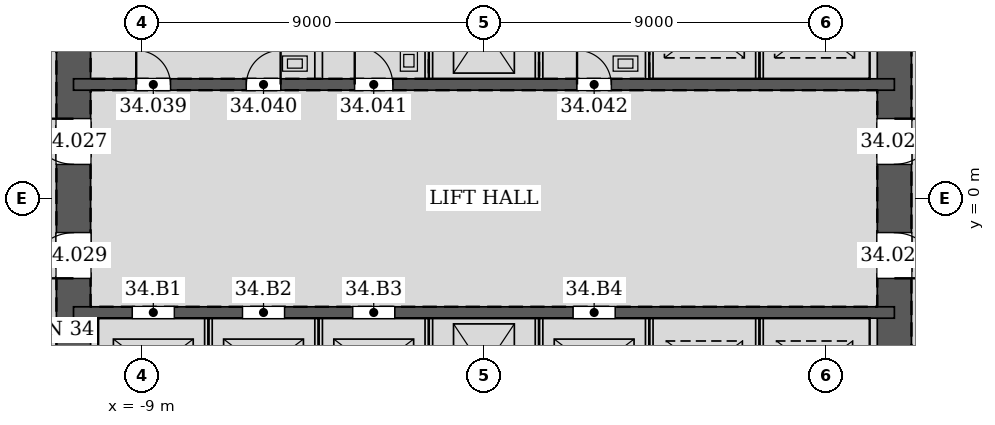
"""IFC4 building model, lengths in metres.
Left out: names, types, materials, properties, quantities, classifications, styles, units other than length and angle.
Written with IfcOpenShell. Run it as: python <this file> out.ifc"""

import sys

from ifc_helpers import new_model, si_unit, direction, frame, frame_2d, origin, place, context, subcontext, project, spatial, rectangle, extrude, element, fill, save


model = new_model("IFC4")
c1 = context("Model", 3, precision=1e-05, world=origin(), true_north=direction((0.0, 1.0)))
c2 = subcontext(c1, "Body", "Model", "MODEL_VIEW")
j1 = project(units=[si_unit("LENGTHUNIT", "METRE"), si_unit("PLANEANGLEUNIT", "RADIAN")], contexts=[c1])
p1 = place(None, origin())
s1 = spatial("IfcSite", under=j1, at=p1, CompositionType="ELEMENT")
p2 = place(p1, origin())
s2 = spatial("IfcBuilding", under=s1, at=p2, CompositionType="ELEMENT")
p3 = place(p2, frame((0.0, 0.0, 151.2)))
s3 = spatial("IfcBuildingStorey", under=s2, at=p3, CompositionType="ELEMENT", Elevation=151.2)
p4 = place(p3, frame((10.8, -10.8, 0.0), z_axis=(0.0, 0.0, 1.0), x_axis=(0.0, 1.0, 0.0)))
e1 = element("IfcWall", 1, at=p4, inside=s3, PredefinedType="SOLIDWALL", context=c2, shape_type="SweptSolid", body=[
    extrude(rectangle(XDim=21.6, YDim=0.9, at=frame_2d((10.8, 0.0))), origin(), (0.0, 0.0, 1.0), 4.2),
])
p5 = place(p4, frame((11.7, 0.0, 0.0)))
e2 = element("IfcOpeningElement", 2, at=p5, cuts=e1, PredefinedType="OPENING", context=c2, shape_type="SweptSolid", body=[
    extrude(rectangle(XDim=1.2, YDim=2.1, at=frame_2d((0.6, 1.05))), frame((0.0, 0.46, 0.0), z_axis=(0.0, -1.0, 0.0), x_axis=(1.0, 0.0, 0.0)), (0.0, 0.0, 1.0), 0.92),
])
p6 = place(p4, frame((8.7, 0.0, 0.0)))
e3 = element("IfcOpeningElement", 3, at=p6, cuts=e1, PredefinedType="OPENING", context=c2, shape_type="SweptSolid", body=[
    extrude(rectangle(XDim=1.2, YDim=2.1, at=frame_2d((0.6, 1.05))), frame((0.0, 0.46, 0.0), z_axis=(0.0, -1.0, 0.0), x_axis=(1.0, 0.0, 0.0)), (0.0, 0.0, 1.0), 0.92),
])
p7 = place(p3, frame((-10.8, 10.8, 0.0), z_axis=(0.0, 0.0, 1.0), x_axis=(0.0, -1.0, 0.0)))
e4 = element("IfcWall", 4, at=p7, inside=s3, PredefinedType="SOLIDWALL", context=c2, shape_type="SweptSolid", body=[
    extrude(rectangle(XDim=21.6, YDim=0.9, at=frame_2d((10.8, 0.0))), origin(), (0.0, 0.0, 1.0), 4.2),
])
p8 = place(p7, frame((8.7, 0.0, 0.0)))
e5 = element("IfcOpeningElement", 5, at=p8, cuts=e4, PredefinedType="OPENING", context=c2, shape_type="SweptSolid", body=[
    extrude(rectangle(XDim=1.2, YDim=2.1, at=frame_2d((0.6, 1.05))), frame((0.0, 0.46, 0.0), z_axis=(0.0, -1.0, 0.0), x_axis=(1.0, 0.0, 0.0)), (0.0, 0.0, 1.0), 0.92),
])
p9 = place(p7, frame((11.7, 0.0, 0.0)))
e6 = element("IfcOpeningElement", 6, at=p9, cuts=e4, PredefinedType="OPENING", context=c2, shape_type="SweptSolid", body=[
    extrude(rectangle(XDim=1.2, YDim=2.1, at=frame_2d((0.6, 1.05))), frame((0.0, 0.46, 0.0), z_axis=(0.0, -1.0, 0.0), x_axis=(1.0, 0.0, 0.0)), (0.0, 0.0, 1.0), 0.92),
])
p10 = place(p3, frame((-10.8, 3.0, 0.0), z_axis=(0.0, 0.0, 1.0), x_axis=(1.0, 0.0, 0.0)))
e7 = element("IfcWall", 7, at=p10, inside=s3, PredefinedType="SOLIDWALL", context=c2, shape_type="SweptSolid", body=[
    extrude(rectangle(XDim=21.6, YDim=0.3, at=frame_2d((10.8, 0.0))), origin(), (0.0, 0.0, 1.0), 4.2),
])
p11 = place(p10, frame((1.65, 0.0, 0.0)))
e8 = element("IfcOpeningElement", 8, at=p11, cuts=e7, PredefinedType="OPENING", context=c2, shape_type="SweptSolid", body=[
    extrude(rectangle(XDim=0.9, YDim=2.1, at=frame_2d((0.45, 1.05))), frame((0.0, 0.16, 0.0), z_axis=(0.0, -1.0, 0.0), x_axis=(1.0, 0.0, 0.0)), (0.0, 0.0, 1.0), 0.32),
])
p12 = place(p10, frame((4.55, 0.0, 0.0)))
e9 = element("IfcOpeningElement", 9, at=p12, cuts=e7, PredefinedType="OPENING", context=c2, shape_type="SweptSolid", body=[
    extrude(rectangle(XDim=0.9, YDim=2.1, at=frame_2d((0.45, 1.05))), frame((0.0, 0.16, 0.0), z_axis=(0.0, -1.0, 0.0), x_axis=(1.0, 0.0, 0.0)), (0.0, 0.0, 1.0), 0.32),
])
p13 = place(p10, frame((7.4, 0.0, 0.0)))
e10 = element("IfcOpeningElement", 10, at=p13, cuts=e7, PredefinedType="OPENING", context=c2, shape_type="SweptSolid", body=[
    extrude(rectangle(XDim=1.0, YDim=2.1, at=frame_2d((0.5, 1.05))), frame((0.0, 0.16, 0.0), z_axis=(0.0, -1.0, 0.0), x_axis=(1.0, 0.0, 0.0)), (0.0, 0.0, 1.0), 0.32),
])
p14 = place(p10, frame((13.25, 0.0, 0.0)))
e11 = element("IfcOpeningElement", 11, at=p14, cuts=e7, PredefinedType="OPENING", context=c2, shape_type="SweptSolid", body=[
    extrude(rectangle(XDim=0.9, YDim=2.1, at=frame_2d((0.45, 1.05))), frame((0.0, 0.16, 0.0), z_axis=(0.0, -1.0, 0.0), x_axis=(1.0, 0.0, 0.0)), (0.0, 0.0, 1.0), 0.32),
])
p15 = place(p3, frame((-10.8, -3.0, 0.0), z_axis=(0.0, 0.0, 1.0), x_axis=(1.0, 0.0, 0.0)))
e12 = element("IfcWall", 12, at=p15, inside=s3, PredefinedType="SOLIDWALL", context=c2, shape_type="SweptSolid", body=[
    extrude(rectangle(XDim=21.6, YDim=0.3, at=frame_2d((10.8, 0.0))), origin(), (0.0, 0.0, 1.0), 4.2),
])
p16 = place(p15, frame((1.55, 0.0, 0.0)))
e13 = element("IfcOpeningElement", 13, at=p16, cuts=e12, PredefinedType="OPENING", context=c2, shape_type="SweptSolid", body=[
    extrude(rectangle(XDim=1.1, YDim=2.1, at=frame_2d((0.55, 1.05))), frame((0.0, 0.16, 0.0), z_axis=(0.0, -1.0, 0.0), x_axis=(1.0, 0.0, 0.0)), (0.0, 0.0, 1.0), 0.32),
])
p17 = place(p15, frame((4.45, 0.0, 0.0)))
e14 = element("IfcOpeningElement", 14, at=p17, cuts=e12, PredefinedType="OPENING", context=c2, shape_type="SweptSolid", body=[
    extrude(rectangle(XDim=1.1, YDim=2.1, at=frame_2d((0.55, 1.05))), frame((0.0, 0.16, 0.0), z_axis=(0.0, -1.0, 0.0), x_axis=(1.0, 0.0, 0.0)), (0.0, 0.0, 1.0), 0.32),
])
p18 = place(p15, frame((7.35, 0.0, 0.0)))
e15 = element("IfcOpeningElement", 15, at=p18, cuts=e12, PredefinedType="OPENING", context=c2, shape_type="SweptSolid", body=[
    extrude(rectangle(XDim=1.1, YDim=2.1, at=frame_2d((0.55, 1.05))), frame((0.0, 0.16, 0.0), z_axis=(0.0, -1.0, 0.0), x_axis=(1.0, 0.0, 0.0)), (0.0, 0.0, 1.0), 0.32),
])
p19 = place(p15, frame((13.15, 0.0, 0.0)))
e16 = element("IfcOpeningElement", 16, at=p19, cuts=e12, PredefinedType="OPENING", context=c2, shape_type="SweptSolid", body=[
    extrude(rectangle(XDim=1.1, YDim=2.1, at=frame_2d((0.55, 1.05))), frame((0.0, 0.16, 0.0), z_axis=(0.0, -1.0, 0.0), x_axis=(1.0, 0.0, 0.0)), (0.0, 0.0, 1.0), 0.32),
])
for number, where, z_axis, x_axis in (
    (17, (-4.35, 3.15, 0.0), (0.0, 0.0, 1.0), (0.0, 1.0, 0.0)),
    (18, (-1.45, 3.15, 0.0), (0.0, 0.0, 1.0), (0.0, 1.0, 0.0)),
    (19, (1.45, 3.15, 0.0), (0.0, 0.0, 1.0), (0.0, 1.0, 0.0)),
    (20, (4.35, 3.15, 0.0), (0.0, 0.0, 1.0), (0.0, 1.0, 0.0)),
):
    element("IfcWall", number, at=place(p3, frame(where, z_axis=z_axis, x_axis=x_axis)), inside=s3, PredefinedType="PARTITIONING", context=c2, shape_type="SweptSolid", body=[
        extrude(rectangle(XDim=2.7, YDim=0.2, at=frame_2d((1.35, 0.0))), origin(), (0.0, 0.0, 1.0), 4.035),
    ])
for number, where, z_axis, x_axis in (
    (21, (7.25, 3.15, 0.0), (0.0, 0.0, 1.0), (0.0, 1.0, 0.0)),
    (22, (-7.25, -5.85, 0.0), (0.0, 0.0, 1.0), (0.0, 1.0, 0.0)),
    (23, (-4.35, -5.85, 0.0), (0.0, 0.0, 1.0), (0.0, 1.0, 0.0)),
    (24, (-1.45, -5.85, 0.0), (0.0, 0.0, 1.0), (0.0, 1.0, 0.0)),
    (25, (1.45, -5.85, 0.0), (0.0, 0.0, 1.0), (0.0, 1.0, 0.0)),
    (26, (4.35, -5.85, 0.0), (0.0, 0.0, 1.0), (0.0, 1.0, 0.0)),
    (27, (7.25, -5.85, 0.0), (0.0, 0.0, 1.0), (0.0, 1.0, 0.0)),
):
    element("IfcWall", number, at=place(p3, frame(where, z_axis=z_axis, x_axis=x_axis)), inside=s3, PredefinedType="PARTITIONING", context=c2, shape_type="SweptSolid", body=[
        extrude(rectangle(XDim=2.7, YDim=0.2, at=frame_2d((1.35, 0.0))), origin(), (0.0, 0.0, 1.0), 4.2),
    ])
p20 = place(p5, frame((1.2, 0.0, 0.0), z_axis=(0.0, 0.0, 1.0), x_axis=(-1.0, 0.0, 0.0)))
e28 = element("IfcDoor", 28, at=p20, inside=s3, OperationType="SINGLE_SWING_LEFT", PredefinedType="DOOR", context=c2, shape_type="SweptSolid", body=[
    extrude(rectangle(XDim=1.2, YDim=2.1, at=frame_2d((0.6, 1.05))), frame((0.0, 0.025, 0.0), z_axis=(0.0, -1.0, 0.0), x_axis=(1.0, 0.0, 0.0)), (0.0, 0.0, 1.0), 0.05),
])
fill(e2, e28)
p21 = place(p8, frame((1.2, 0.0, 0.0), z_axis=(0.0, 0.0, 1.0), x_axis=(-1.0, 0.0, 0.0)))
e29 = element("IfcDoor", 29, at=p21, inside=s3, OperationType="SINGLE_SWING_RIGHT", PredefinedType="DOOR", context=c2, shape_type="SweptSolid", body=[
    extrude(rectangle(XDim=1.2, YDim=2.1, at=frame_2d((0.6, 1.05))), frame((0.0, 0.025, 0.0), z_axis=(0.0, -1.0, 0.0), x_axis=(1.0, 0.0, 0.0)), (0.0, 0.0, 1.0), 0.05),
])
fill(e5, e29)
p22 = place(p6, frame((1.2, 0.0, 0.0), z_axis=(0.0, 0.0, 1.0), x_axis=(-1.0, 0.0, 0.0)))
e30 = element("IfcDoor", 30, at=p22, inside=s3, OperationType="SINGLE_SWING_RIGHT", PredefinedType="DOOR", context=c2, shape_type="SweptSolid", body=[
    extrude(rectangle(XDim=1.2, YDim=2.1, at=frame_2d((0.6, 1.05))), frame((0.0, 0.025, 0.0), z_axis=(0.0, -1.0, 0.0), x_axis=(1.0, 0.0, 0.0)), (0.0, 0.0, 1.0), 0.05),
])
fill(e3, e30)
p23 = place(p9, frame((1.2, 0.0, 0.0), z_axis=(0.0, 0.0, 1.0), x_axis=(-1.0, 0.0, 0.0)))
e31 = element("IfcDoor", 31, at=p23, inside=s3, OperationType="SINGLE_SWING_LEFT", PredefinedType="DOOR", context=c2, shape_type="SweptSolid", body=[
    extrude(rectangle(XDim=1.2, YDim=2.1, at=frame_2d((0.6, 1.05))), frame((0.0, 0.025, 0.0), z_axis=(0.0, -1.0, 0.0), x_axis=(1.0, 0.0, 0.0)), (0.0, 0.0, 1.0), 0.05),
])
fill(e6, e31)
p24 = place(p11, origin())
e32 = element("IfcDoor", 32, at=p24, inside=s3, OperationType="SINGLE_SWING_LEFT", PredefinedType="DOOR", context=c2, shape_type="SweptSolid", body=[
    extrude(rectangle(XDim=0.9, YDim=2.1, at=frame_2d((0.45, 1.05))), frame((0.0, 0.025, 0.0), z_axis=(0.0, -1.0, 0.0), x_axis=(1.0, 0.0, 0.0)), (0.0, 0.0, 1.0), 0.05),
])
fill(e8, e32)
p25 = place(p12, origin())
e33 = element("IfcDoor", 33, at=p25, inside=s3, OperationType="SINGLE_SWING_RIGHT", PredefinedType="DOOR", context=c2, shape_type="SweptSolid", body=[
    extrude(rectangle(XDim=0.9, YDim=2.1, at=frame_2d((0.45, 1.05))), frame((0.0, 0.025, 0.0), z_axis=(0.0, -1.0, 0.0), x_axis=(1.0, 0.0, 0.0)), (0.0, 0.0, 1.0), 0.05),
])
fill(e9, e33)
p26 = place(p13, origin())
e34 = element("IfcDoor", 34, at=p26, inside=s3, OperationType="SINGLE_SWING_LEFT", PredefinedType="DOOR", context=c2, shape_type="SweptSolid", body=[
    extrude(rectangle(XDim=1.0, YDim=2.1, at=frame_2d((0.5, 1.05))), frame((0.0, 0.025, 0.0), z_axis=(0.0, -1.0, 0.0), x_axis=(1.0, 0.0, 0.0)), (0.0, 0.0, 1.0), 0.05),
])
fill(e10, e34)
p27 = place(p14, origin())
e35 = element("IfcDoor", 35, at=p27, inside=s3, OperationType="SINGLE_SWING_LEFT", PredefinedType="DOOR", context=c2, shape_type="SweptSolid", body=[
    extrude(rectangle(XDim=0.9, YDim=2.1, at=frame_2d((0.45, 1.05))), frame((0.0, 0.025, 0.0), z_axis=(0.0, -1.0, 0.0), x_axis=(1.0, 0.0, 0.0)), (0.0, 0.0, 1.0), 0.05),
])
fill(e11, e35)
p28 = place(p16, origin())
e36 = element("IfcDoor", 36, at=p28, inside=s3, OperationType="DOUBLE_DOOR_SLIDING", PredefinedType="DOOR", context=c2, shape_type="SweptSolid", body=[
    extrude(rectangle(XDim=1.1, YDim=2.1, at=frame_2d((0.55, 1.05))), frame((0.0, 0.025, 0.0), z_axis=(0.0, -1.0, 0.0), x_axis=(1.0, 0.0, 0.0)), (0.0, 0.0, 1.0), 0.05),
])
fill(e13, e36)
p29 = place(p17, origin())
e37 = element("IfcDoor", 37, at=p29, inside=s3, OperationType="DOUBLE_DOOR_SLIDING", PredefinedType="DOOR", context=c2, shape_type="SweptSolid", body=[
    extrude(rectangle(XDim=1.1, YDim=2.1, at=frame_2d((0.55, 1.05))), frame((0.0, 0.025, 0.0), z_axis=(0.0, -1.0, 0.0), x_axis=(1.0, 0.0, 0.0)), (0.0, 0.0, 1.0), 0.05),
])
fill(e14, e37)
p30 = place(p18, origin())
e38 = element("IfcDoor", 38, at=p30, inside=s3, OperationType="DOUBLE_DOOR_SLIDING", PredefinedType="DOOR", context=c2, shape_type="SweptSolid", body=[
    extrude(rectangle(XDim=1.1, YDim=2.1, at=frame_2d((0.55, 1.05))), frame((0.0, 0.025, 0.0), z_axis=(0.0, -1.0, 0.0), x_axis=(1.0, 0.0, 0.0)), (0.0, 0.0, 1.0), 0.05),
])
fill(e15, e38)
p31 = place(p19, origin())
e39 = element("IfcDoor", 39, at=p31, inside=s3, OperationType="DOUBLE_DOOR_SLIDING", PredefinedType="DOOR", context=c2, shape_type="SweptSolid", body=[
    extrude(rectangle(XDim=1.1, YDim=2.1, at=frame_2d((0.55, 1.05))), frame((0.0, 0.025, 0.0), z_axis=(0.0, -1.0, 0.0), x_axis=(1.0, 0.0, 0.0)), (0.0, 0.0, 1.0), 0.05),
])
fill(e16, e39)
save(model, sys.argv[1])
